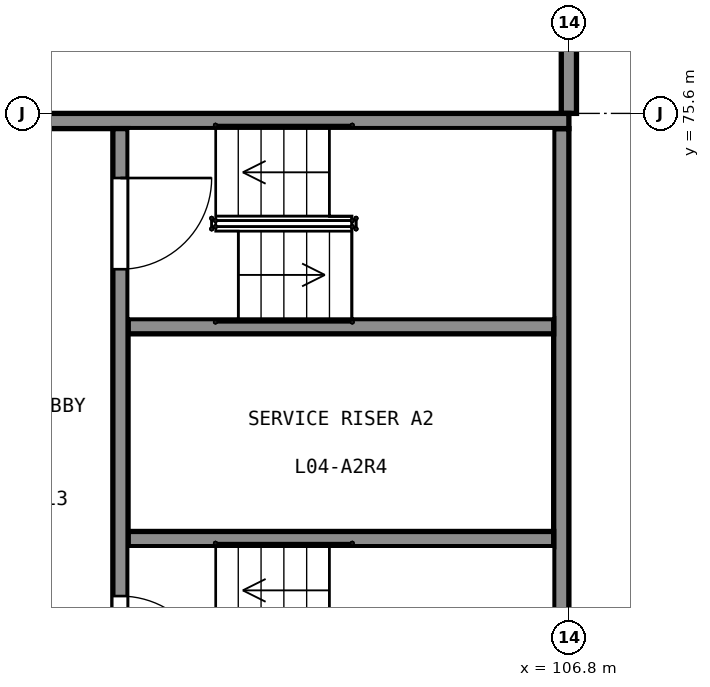
"""IFC4 building model, lengths in metres.
Left out: names, types, materials, properties, quantities, classifications, styles, units other than length and angle.
Written with IfcOpenShell. Run it as: python <this file> out.ifc"""

import sys

from ifc_helpers import new_model, si_unit, direction, frame, frame_2d, origin, place, context, subcontext, project, spatial, rectangle, extrude, element, fill, save


model = new_model("IFC4")
c1 = context("Model", 3, precision=1e-05, world=origin(), true_north=direction((0.0, 1.0)))
c2 = subcontext(c1, "Body", "Model", "MODEL_VIEW")
j1 = project(units=[si_unit("LENGTHUNIT", "METRE"), si_unit("PLANEANGLEUNIT", "RADIAN")], contexts=[c1])
p1 = place(None, origin())
s1 = spatial("IfcSite", under=j1, at=p1, CompositionType="ELEMENT")
p2 = place(p1, origin())
s2 = spatial("IfcBuilding", under=s1, at=p2, CompositionType="ELEMENT")
p3 = place(p2, frame((0.0, 0.0, 25.0)))
s3 = spatial("IfcBuildingStorey", under=s2, at=p3, CompositionType="ELEMENT", Elevation=25.0)
p4 = place(p3, frame((98.4, 75.5, 0.0), z_axis=(0.0, 0.0, 1.0), x_axis=(1.0, 0.0, 0.0)))
e1 = element("IfcWall", 1, at=p4, inside=s3, PredefinedType="SHEAR", context=c2, shape_type="SweptSolid", body=[
    extrude(rectangle(XDim=8.4, YDim=0.2, at=frame_2d((4.2, 0.0))), origin(), (0.0, 0.0, 1.0), 5.0),
])
p5 = place(p3, frame((106.7, 67.4, 0.0), z_axis=(0.0, 0.0, 1.0), x_axis=(0.0, 1.0, 0.0)))
e2 = element("IfcWall", 2, at=p5, inside=s3, PredefinedType="SHEAR", context=c2, shape_type="SweptSolid", body=[
    extrude(rectangle(XDim=8.0, YDim=0.2, at=frame_2d((4.0, 0.0))), origin(), (0.0, 0.0, 1.0), 5.0),
])
p6 = place(p3, frame((100.9, 67.4, 0.0), z_axis=(0.0, 0.0, 1.0), x_axis=(0.0, 1.0, 0.0)))
e3 = element("IfcWall", 3, at=p6, inside=s3, PredefinedType="SHEAR", context=c2, shape_type="SweptSolid", body=[
    extrude(rectangle(XDim=8.0, YDim=0.2, at=frame_2d((4.0, 0.0))), origin(), (0.0, 0.0, 1.0), 5.0),
])
p7 = place(p6, frame((0.65, 0.0, 0.0)))
e4 = element("IfcOpeningElement", 4, at=p7, cuts=e3, PredefinedType="OPENING", context=c2, shape_type="SweptSolid", body=[
    extrude(rectangle(XDim=1.2, YDim=2.1, at=frame_2d((0.6, 1.05))), frame((0.0, 0.11, 0.0), z_axis=(0.0, -1.0, 0.0), x_axis=(1.0, 0.0, 0.0)), (0.0, 0.0, 1.0), 0.22),
])
p8 = place(p6, frame((6.15, 0.0, 0.0)))
e5 = element("IfcOpeningElement", 5, at=p8, cuts=e3, PredefinedType="OPENING", context=c2, shape_type="SweptSolid", body=[
    extrude(rectangle(XDim=1.2, YDim=2.1, at=frame_2d((0.6, 1.05))), frame((0.0, 0.11, 0.0), z_axis=(0.0, -1.0, 0.0), x_axis=(1.0, 0.0, 0.0)), (0.0, 0.0, 1.0), 0.22),
])
for number, where, z_axis, x_axis in (
    (6, (101.0, 70.0, 0.0), (0.0, 0.0, 1.0), (1.0, 0.0, 0.0)),
    (7, (101.0, 72.8, 0.0), (0.0, 0.0, 1.0), (1.0, 0.0, 0.0)),
):
    element("IfcWall", number, at=place(p3, frame(where, z_axis=z_axis, x_axis=x_axis)), inside=s3, PredefinedType="SHEAR", context=c2, shape_type="SweptSolid", body=[
        extrude(rectangle(XDim=5.6, YDim=0.2, at=frame_2d((2.8, 0.0))), origin(), (0.0, 0.0, 1.0), 5.0),
    ])
p9 = place(p3, frame((106.8, 75.6, 0.0), z_axis=(0.0, 0.0, 1.0), x_axis=(0.0, 1.0, 0.0)))
e8 = element("IfcWall", 8, at=p9, inside=s3, PredefinedType="PARTITIONING", context=c2, shape_type="SweptSolid", body=[
    extrude(rectangle(XDim=8.1, YDim=0.2, at=frame_2d((4.05, 0.0))), origin(), (0.0, 0.0, 1.0), 3.9),
])
p10 = place(p9, frame((1.025, 0.0, 0.0)))
e9 = element("IfcOpeningElement", 9, at=p10, cuts=e8, PredefinedType="OPENING", context=c2, shape_type="SweptSolid", body=[
    extrude(rectangle(XDim=2.4, YDim=2.4, at=frame_2d((1.2, 1.2))), frame((0.0, 0.11, 0.0), z_axis=(0.0, -1.0, 0.0), x_axis=(1.0, 0.0, 0.0)), (0.0, 0.0, 1.0), 0.22),
])
p11 = place(p7, origin())
e10 = element("IfcDoor", 10, at=p11, inside=s3, OperationType="SINGLE_SWING_LEFT", PredefinedType="DOOR", context=c2, shape_type="SweptSolid", body=[
    extrude(rectangle(XDim=1.2, YDim=2.1, at=frame_2d((0.6, 1.05))), frame((0.0, 0.025, 0.0), z_axis=(0.0, -1.0, 0.0), x_axis=(1.0, 0.0, 0.0)), (0.0, 0.0, 1.0), 0.05),
])
fill(e4, e10)
p12 = place(p8, origin())
e11 = element("IfcDoor", 11, at=p12, inside=s3, OperationType="SINGLE_SWING_RIGHT", PredefinedType="DOOR", context=c2, shape_type="SweptSolid", body=[
    extrude(rectangle(XDim=1.2, YDim=2.1, at=frame_2d((0.6, 1.05))), frame((0.0, 0.025, 0.0), z_axis=(0.0, -1.0, 0.0), x_axis=(1.0, 0.0, 0.0)), (0.0, 0.0, 1.0), 0.05),
])
fill(e5, e11)
save(model, sys.argv[1])
